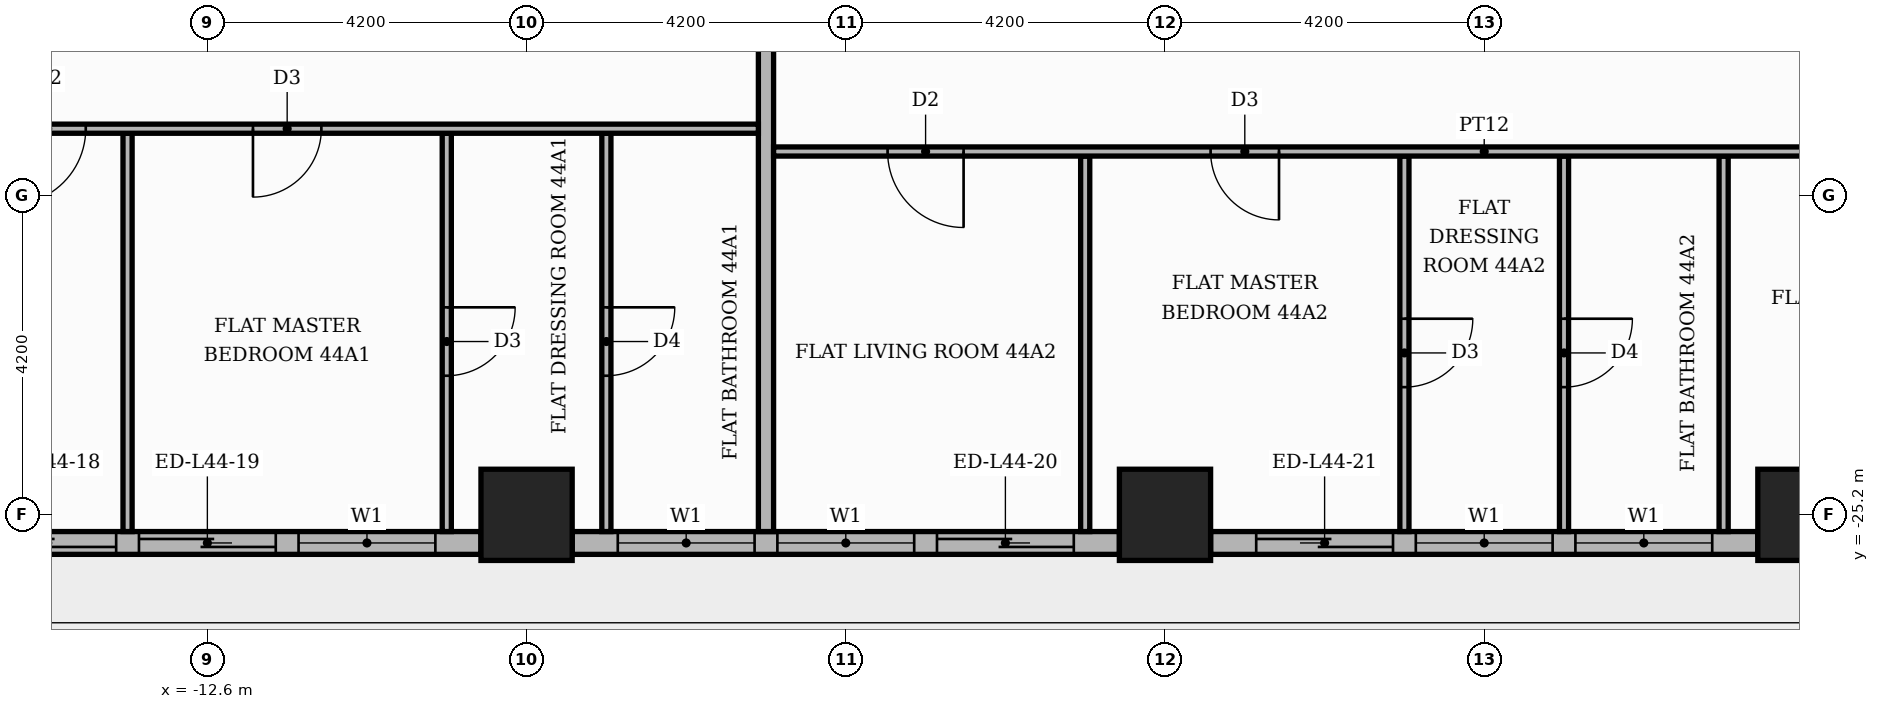
"""IFC4 building model, lengths in metres.
Left out: names, types, materials, properties, quantities, classifications, styles, units other than length and angle.
Written with IfcOpenShell. Run it as: python <this file> out.ifc"""

import sys

from ifc_helpers import new_model, si_unit, direction, frame, frame_2d, origin, origin_2d, place, context, subcontext, project, spatial, rectangle, extrude, element, fill, save


model = new_model("IFC4")
c1 = context("Model", 3, precision=1e-05, world=origin(), true_north=direction((0.0, 1.0)))
c2 = subcontext(c1, "Body", "Model", "MODEL_VIEW")
j1 = project(units=[si_unit("LENGTHUNIT", "METRE"), si_unit("PLANEANGLEUNIT", "RADIAN")], contexts=[c1])
p1 = place(None, origin())
s1 = spatial("IfcSite", under=j1, at=p1, CompositionType="ELEMENT")
p2 = place(p1, origin())
s2 = spatial("IfcBuilding", under=s1, at=p2, CompositionType="ELEMENT")
p3 = place(p2, frame((0.0, 0.0, 188.4)))
s3 = spatial("IfcBuildingStorey", under=s2, at=p3, CompositionType="ELEMENT", Elevation=188.4)
for number, where, z_axis, x_axis in (
    (1, (0.0, -25.2, 0.0), (0.0, 0.0, 1.0), (1.0, 0.0, 0.0)),
    (2, (8.4, -25.2, 0.0), (0.0, 0.0, 1.0), (1.0, 0.0, 0.0)),
    (3, (-8.4, -25.2, 0.0), (0.0, 0.0, 1.0), (1.0, 0.0, 0.0)),
):
    element("IfcColumn", number, at=place(p3, frame(where, z_axis=z_axis, x_axis=x_axis)), inside=s3, PredefinedType="COLUMN", context=c2, shape_type="SweptSolid", body=[
        extrude(rectangle(XDim=1.2, YDim=1.2, at=origin_2d()), origin(), (0.0, 0.0, 1.0), 3.9),
    ])
p4 = place(p3, frame((-16.2, -25.57, 0.0), z_axis=(0.0, 0.0, 1.0), x_axis=(1.0, 0.0, 0.0)))
e4 = element("IfcWall", 4, at=p4, inside=s3, PredefinedType="STANDARD", context=c2, shape_type="SweptSolid", body=[
    extrude(rectangle(XDim=7.2, YDim=0.3, at=frame_2d((3.6, 0.0))), origin(), (0.0, 0.0, 1.0), 3.48),
])
p5 = place(p4, frame((0.6, 0.0, 0.0)))
e5 = element("IfcOpeningElement", 5, at=p5, cuts=e4, PredefinedType="OPENING", context=c2, shape_type="SweptSolid", body=[
    extrude(rectangle(XDim=1.8, YDim=2.4, at=frame_2d((0.9, 1.2))), frame((0.0, 0.16, 0.0), z_axis=(0.0, -1.0, 0.0), x_axis=(1.0, 0.0, 0.0)), (0.0, 0.0, 1.0), 0.32),
])
p6 = place(p4, frame((2.7, 0.0, 0.0)))
e6 = element("IfcOpeningElement", 6, at=p6, cuts=e4, PredefinedType="OPENING", context=c2, shape_type="SweptSolid", body=[
    extrude(rectangle(XDim=1.8, YDim=2.4, at=frame_2d((0.9, 1.2))), frame((0.0, 0.16, 0.0), z_axis=(0.0, -1.0, 0.0), x_axis=(1.0, 0.0, 0.0)), (0.0, 0.0, 1.0), 0.32),
])
p7 = place(p4, frame((4.8, 0.0, 0.9)))
e7 = element("IfcOpeningElement", 7, at=p7, cuts=e4, PredefinedType="OPENING", context=c2, shape_type="SweptSolid", body=[
    extrude(rectangle(XDim=1.8, YDim=2.1, at=frame_2d((0.9, 1.05))), frame((0.0, 0.16, 0.0), z_axis=(0.0, -1.0, 0.0), x_axis=(1.0, 0.0, 0.0)), (0.0, 0.0, 1.0), 0.32),
])
p8 = place(p3, frame((-7.8, -25.57, 0.0), z_axis=(0.0, 0.0, 1.0), x_axis=(1.0, 0.0, 0.0)))
e8 = element("IfcWall", 8, at=p8, inside=s3, PredefinedType="STANDARD", context=c2, shape_type="SweptSolid", body=[
    extrude(rectangle(XDim=7.2, YDim=0.3, at=frame_2d((3.6, 0.0))), origin(), (0.0, 0.0, 1.0), 3.48),
])
p9 = place(p8, frame((0.6, 0.0, 0.9)))
e9 = element("IfcOpeningElement", 9, at=p9, cuts=e8, PredefinedType="OPENING", context=c2, shape_type="SweptSolid", body=[
    extrude(rectangle(XDim=1.8, YDim=2.1, at=frame_2d((0.9, 1.05))), frame((0.0, 0.16, 0.0), z_axis=(0.0, -1.0, 0.0), x_axis=(1.0, 0.0, 0.0)), (0.0, 0.0, 1.0), 0.32),
])
p10 = place(p8, frame((2.7, 0.0, 0.9)))
e10 = element("IfcOpeningElement", 10, at=p10, cuts=e8, PredefinedType="OPENING", context=c2, shape_type="SweptSolid", body=[
    extrude(rectangle(XDim=1.8, YDim=2.1, at=frame_2d((0.9, 1.05))), frame((0.0, 0.16, 0.0), z_axis=(0.0, -1.0, 0.0), x_axis=(1.0, 0.0, 0.0)), (0.0, 0.0, 1.0), 0.32),
])
p11 = place(p8, frame((4.8, 0.0, 0.0)))
e11 = element("IfcOpeningElement", 11, at=p11, cuts=e8, PredefinedType="OPENING", context=c2, shape_type="SweptSolid", body=[
    extrude(rectangle(XDim=1.8, YDim=2.4, at=frame_2d((0.9, 1.2))), frame((0.0, 0.16, 0.0), z_axis=(0.0, -1.0, 0.0), x_axis=(1.0, 0.0, 0.0)), (0.0, 0.0, 1.0), 0.32),
])
p12 = place(p3, frame((0.6, -25.57, 0.0), z_axis=(0.0, 0.0, 1.0), x_axis=(1.0, 0.0, 0.0)))
e12 = element("IfcWall", 12, at=p12, inside=s3, PredefinedType="STANDARD", context=c2, shape_type="SweptSolid", body=[
    extrude(rectangle(XDim=7.2, YDim=0.3, at=frame_2d((3.6, 0.0))), origin(), (0.0, 0.0, 1.0), 3.48),
])
p13 = place(p12, frame((0.6, 0.0, 0.0)))
e13 = element("IfcOpeningElement", 13, at=p13, cuts=e12, PredefinedType="OPENING", context=c2, shape_type="SweptSolid", body=[
    extrude(rectangle(XDim=1.8, YDim=2.4, at=frame_2d((0.9, 1.2))), frame((0.0, 0.16, 0.0), z_axis=(0.0, -1.0, 0.0), x_axis=(1.0, 0.0, 0.0)), (0.0, 0.0, 1.0), 0.32),
])
p14 = place(p12, frame((2.7, 0.0, 0.9)))
e14 = element("IfcOpeningElement", 14, at=p14, cuts=e12, PredefinedType="OPENING", context=c2, shape_type="SweptSolid", body=[
    extrude(rectangle(XDim=1.8, YDim=2.1, at=frame_2d((0.9, 1.05))), frame((0.0, 0.16, 0.0), z_axis=(0.0, -1.0, 0.0), x_axis=(1.0, 0.0, 0.0)), (0.0, 0.0, 1.0), 0.32),
])
p15 = place(p12, frame((4.8, 0.0, 0.9)))
e15 = element("IfcOpeningElement", 15, at=p15, cuts=e12, PredefinedType="OPENING", context=c2, shape_type="SweptSolid", body=[
    extrude(rectangle(XDim=1.8, YDim=2.1, at=frame_2d((0.9, 1.05))), frame((0.0, 0.16, 0.0), z_axis=(0.0, -1.0, 0.0), x_axis=(1.0, 0.0, 0.0)), (0.0, 0.0, 1.0), 0.32),
])
p16 = place(p3, frame((-13.65, -25.42, 0.0), z_axis=(0.0, 0.0, 1.0), x_axis=(0.0, 1.0, 0.0)))
e16 = element("IfcWall", 16, at=p16, inside=s3, PredefinedType="PARTITIONING", context=c2, shape_type="SweptSolid", body=[
    extrude(rectangle(XDim=5.24, YDim=0.12, at=frame_2d((2.62, 0.0))), origin(), (0.0, 0.0, 1.0), 3.48),
])
p17 = place(p3, frame((-9.45, -25.42, 0.0), z_axis=(0.0, 0.0, 1.0), x_axis=(0.0, 1.0, 0.0)))
e17 = element("IfcWall", 17, at=p17, inside=s3, PredefinedType="PARTITIONING", context=c2, shape_type="SweptSolid", body=[
    extrude(rectangle(XDim=5.24, YDim=0.12, at=frame_2d((2.62, 0.0))), origin(), (0.0, 0.0, 1.0), 3.48),
])
p18 = place(p17, frame((2.05, 0.0, 0.0)))
e18 = element("IfcOpeningElement", 18, at=p18, cuts=e17, PredefinedType="OPENING", context=c2, shape_type="SweptSolid", body=[
    extrude(rectangle(XDim=0.9, YDim=2.1, at=frame_2d((0.45, 1.05))), frame((0.0, 0.07, 0.0), z_axis=(0.0, -1.0, 0.0), x_axis=(1.0, 0.0, 0.0)), (0.0, 0.0, 1.0), 0.14),
])
p19 = place(p3, frame((-7.35, -25.42, 0.0), z_axis=(0.0, 0.0, 1.0), x_axis=(0.0, 1.0, 0.0)))
e19 = element("IfcWall", 19, at=p19, inside=s3, PredefinedType="PARTITIONING", context=c2, shape_type="SweptSolid", body=[
    extrude(rectangle(XDim=5.24, YDim=0.12, at=frame_2d((2.62, 0.0))), origin(), (0.0, 0.0, 1.0), 3.48),
])
p20 = place(p19, frame((2.05, 0.0, 0.0)))
e20 = element("IfcOpeningElement", 20, at=p20, cuts=e19, PredefinedType="OPENING", context=c2, shape_type="SweptSolid", body=[
    extrude(rectangle(XDim=0.9, YDim=2.1, at=frame_2d((0.45, 1.05))), frame((0.0, 0.07, 0.0), z_axis=(0.0, -1.0, 0.0), x_axis=(1.0, 0.0, 0.0)), (0.0, 0.0, 1.0), 0.14),
])
p21 = place(p3, frame((-5.25, -25.42, 0.0), z_axis=(0.0, 0.0, 1.0), x_axis=(0.0, 1.0, 0.0)))
e21 = element("IfcWall", 21, at=p21, inside=s3, PredefinedType="PARTITIONING", context=c2, shape_type="SweptSolid", body=[
    extrude(rectangle(XDim=11.67, YDim=0.2, at=frame_2d((5.835, 0.0))), origin(), (0.0, 0.0, 1.0), 3.48),
])
p22 = place(p3, frame((-1.05, -25.42, 0.0), z_axis=(0.0, 0.0, 1.0), x_axis=(0.0, 1.0, 0.0)))
e22 = element("IfcWall", 22, at=p22, inside=s3, PredefinedType="PARTITIONING", context=c2, shape_type="SweptSolid", body=[
    extrude(rectangle(XDim=4.94, YDim=0.12, at=frame_2d((2.47, 0.0))), origin(), (0.0, 0.0, 1.0), 3.48),
])
p23 = place(p3, frame((3.15, -25.42, 0.0), z_axis=(0.0, 0.0, 1.0), x_axis=(0.0, 1.0, 0.0)))
e23 = element("IfcWall", 23, at=p23, inside=s3, PredefinedType="PARTITIONING", context=c2, shape_type="SweptSolid", body=[
    extrude(rectangle(XDim=4.94, YDim=0.12, at=frame_2d((2.47, 0.0))), origin(), (0.0, 0.0, 1.0), 3.48),
])
p24 = place(p23, frame((1.9, 0.0, 0.0)))
e24 = element("IfcOpeningElement", 24, at=p24, cuts=e23, PredefinedType="OPENING", context=c2, shape_type="SweptSolid", body=[
    extrude(rectangle(XDim=0.9, YDim=2.1, at=frame_2d((0.45, 1.05))), frame((0.0, 0.07, 0.0), z_axis=(0.0, -1.0, 0.0), x_axis=(1.0, 0.0, 0.0)), (0.0, 0.0, 1.0), 0.14),
])
p25 = place(p3, frame((5.25, -25.42, 0.0), z_axis=(0.0, 0.0, 1.0), x_axis=(0.0, 1.0, 0.0)))
e25 = element("IfcWall", 25, at=p25, inside=s3, PredefinedType="PARTITIONING", context=c2, shape_type="SweptSolid", body=[
    extrude(rectangle(XDim=4.94, YDim=0.12, at=frame_2d((2.47, 0.0))), origin(), (0.0, 0.0, 1.0), 3.48),
])
p26 = place(p25, frame((1.9, 0.0, 0.0)))
e26 = element("IfcOpeningElement", 26, at=p26, cuts=e25, PredefinedType="OPENING", context=c2, shape_type="SweptSolid", body=[
    extrude(rectangle(XDim=0.9, YDim=2.1, at=frame_2d((0.45, 1.05))), frame((0.0, 0.07, 0.0), z_axis=(0.0, -1.0, 0.0), x_axis=(1.0, 0.0, 0.0)), (0.0, 0.0, 1.0), 0.14),
])
p27 = place(p3, frame((7.35, -25.42, 0.0), z_axis=(0.0, 0.0, 1.0), x_axis=(0.0, 1.0, 0.0)))
e27 = element("IfcWall", 27, at=p27, inside=s3, PredefinedType="PARTITIONING", context=c2, shape_type="SweptSolid", body=[
    extrude(rectangle(XDim=4.94, YDim=0.12, at=frame_2d((2.47, 0.0))), origin(), (0.0, 0.0, 1.0), 3.48),
])
p28 = place(p3, frame((-5.15, -20.42, 0.0), z_axis=(0.0, 0.0, 1.0), x_axis=(1.0, 0.0, 0.0)))
e28 = element("IfcWall", 28, at=p28, inside=s3, PredefinedType="PARTITIONING", context=c2, shape_type="SweptSolid", body=[
    extrude(rectangle(XDim=18.7, YDim=0.12, at=frame_2d((9.35, 0.0))), origin(), (0.0, 0.0, 1.0), 3.48),
])
p29 = place(p28, frame((1.5, 0.0, 0.0)))
e29 = element("IfcOpeningElement", 29, at=p29, cuts=e28, PredefinedType="OPENING", context=c2, shape_type="SweptSolid", body=[
    extrude(rectangle(XDim=1.0, YDim=2.1, at=frame_2d((0.5, 1.05))), frame((0.0, 0.07, 0.0), z_axis=(0.0, -1.0, 0.0), x_axis=(1.0, 0.0, 0.0)), (0.0, 0.0, 1.0), 0.14),
])
p30 = place(p28, frame((5.75, 0.0, 0.0)))
e30 = element("IfcOpeningElement", 30, at=p30, cuts=e28, PredefinedType="OPENING", context=c2, shape_type="SweptSolid", body=[
    extrude(rectangle(XDim=0.9, YDim=2.1, at=frame_2d((0.45, 1.05))), frame((0.0, 0.07, 0.0), z_axis=(0.0, -1.0, 0.0), x_axis=(1.0, 0.0, 0.0)), (0.0, 0.0, 1.0), 0.14),
])
p31 = place(p28, frame((14.15, 0.0, 0.0)))
e31 = element("IfcOpeningElement", 31, at=p31, cuts=e28, PredefinedType="OPENING", context=c2, shape_type="SweptSolid", body=[
    extrude(rectangle(XDim=0.9, YDim=2.1, at=frame_2d((0.45, 1.05))), frame((0.0, 0.07, 0.0), z_axis=(0.0, -1.0, 0.0), x_axis=(1.0, 0.0, 0.0)), (0.0, 0.0, 1.0), 0.14),
])
p32 = place(p3, frame((-25.42, -20.12, 0.0), z_axis=(0.0, 0.0, 1.0), x_axis=(1.0, 0.0, 0.0)))
e32 = element("IfcWall", 32, at=p32, inside=s3, PredefinedType="PARTITIONING", context=c2, shape_type="SweptSolid", body=[
    extrude(rectangle(XDim=20.07, YDim=0.12, at=frame_2d((10.035, 0.0))), origin(), (0.0, 0.0, 1.0), 3.48),
])
p33 = place(p32, frame((10.22, 0.0, 0.0)))
e33 = element("IfcOpeningElement", 33, at=p33, cuts=e32, PredefinedType="OPENING", context=c2, shape_type="SweptSolid", body=[
    extrude(rectangle(XDim=1.0, YDim=2.1, at=frame_2d((0.5, 1.05))), frame((0.0, 0.07, 0.0), z_axis=(0.0, -1.0, 0.0), x_axis=(1.0, 0.0, 0.0)), (0.0, 0.0, 1.0), 0.14),
])
p34 = place(p32, frame((13.42, 0.0, 0.0)))
e34 = element("IfcOpeningElement", 34, at=p34, cuts=e32, PredefinedType="OPENING", context=c2, shape_type="SweptSolid", body=[
    extrude(rectangle(XDim=0.9, YDim=2.1, at=frame_2d((0.45, 1.05))), frame((0.0, 0.07, 0.0), z_axis=(0.0, -1.0, 0.0), x_axis=(1.0, 0.0, 0.0)), (0.0, 0.0, 1.0), 0.14),
])
p35 = place(p5, origin())
e35 = element("IfcDoor", 35, at=p35, inside=s3, OperationType="SLIDING_TO_LEFT", PredefinedType="DOOR", context=c2, shape_type="SweptSolid", body=[
    extrude(rectangle(XDim=1.8, YDim=2.4, at=frame_2d((0.9, 1.2))), frame((0.0, 0.025, 0.0), z_axis=(0.0, -1.0, 0.0), x_axis=(1.0, 0.0, 0.0)), (0.0, 0.0, 1.0), 0.05),
])
fill(e5, e35)
p36 = place(p6, origin())
e36 = element("IfcDoor", 36, at=p36, inside=s3, OperationType="SLIDING_TO_RIGHT", PredefinedType="DOOR", context=c2, shape_type="SweptSolid", body=[
    extrude(rectangle(XDim=1.8, YDim=2.4, at=frame_2d((0.9, 1.2))), frame((0.0, 0.025, 0.0), z_axis=(0.0, -1.0, 0.0), x_axis=(1.0, 0.0, 0.0)), (0.0, 0.0, 1.0), 0.05),
])
fill(e6, e36)
p37 = place(p7, origin())
e37 = element("IfcWindow", 37, at=p37, inside=s3, PartitioningType="SINGLE_PANEL", PredefinedType="WINDOW", context=c2, shape_type="SweptSolid", body=[
    extrude(rectangle(XDim=1.8, YDim=2.1, at=frame_2d((0.9, 1.05))), frame((0.0, 0.03, 0.0), z_axis=(0.0, -1.0, 0.0), x_axis=(1.0, 0.0, 0.0)), (0.0, 0.0, 1.0), 0.06),
])
fill(e7, e37)
p38 = place(p9, origin())
e38 = element("IfcWindow", 38, at=p38, inside=s3, PartitioningType="SINGLE_PANEL", PredefinedType="WINDOW", context=c2, shape_type="SweptSolid", body=[
    extrude(rectangle(XDim=1.8, YDim=2.1, at=frame_2d((0.9, 1.05))), frame((0.0, 0.03, 0.0), z_axis=(0.0, -1.0, 0.0), x_axis=(1.0, 0.0, 0.0)), (0.0, 0.0, 1.0), 0.06),
])
fill(e9, e38)
p39 = place(p10, origin())
e39 = element("IfcWindow", 39, at=p39, inside=s3, PartitioningType="SINGLE_PANEL", PredefinedType="WINDOW", context=c2, shape_type="SweptSolid", body=[
    extrude(rectangle(XDim=1.8, YDim=2.1, at=frame_2d((0.9, 1.05))), frame((0.0, 0.03, 0.0), z_axis=(0.0, -1.0, 0.0), x_axis=(1.0, 0.0, 0.0)), (0.0, 0.0, 1.0), 0.06),
])
fill(e10, e39)
p40 = place(p11, origin())
e40 = element("IfcDoor", 40, at=p40, inside=s3, OperationType="SLIDING_TO_RIGHT", PredefinedType="DOOR", context=c2, shape_type="SweptSolid", body=[
    extrude(rectangle(XDim=1.8, YDim=2.4, at=frame_2d((0.9, 1.2))), frame((0.0, 0.025, 0.0), z_axis=(0.0, -1.0, 0.0), x_axis=(1.0, 0.0, 0.0)), (0.0, 0.0, 1.0), 0.05),
])
fill(e11, e40)
p41 = place(p13, origin())
e41 = element("IfcDoor", 41, at=p41, inside=s3, OperationType="SLIDING_TO_LEFT", PredefinedType="DOOR", context=c2, shape_type="SweptSolid", body=[
    extrude(rectangle(XDim=1.8, YDim=2.4, at=frame_2d((0.9, 1.2))), frame((0.0, 0.025, 0.0), z_axis=(0.0, -1.0, 0.0), x_axis=(1.0, 0.0, 0.0)), (0.0, 0.0, 1.0), 0.05),
])
fill(e13, e41)
p42 = place(p14, origin())
e42 = element("IfcWindow", 42, at=p42, inside=s3, PartitioningType="SINGLE_PANEL", PredefinedType="WINDOW", context=c2, shape_type="SweptSolid", body=[
    extrude(rectangle(XDim=1.8, YDim=2.1, at=frame_2d((0.9, 1.05))), frame((0.0, 0.03, 0.0), z_axis=(0.0, -1.0, 0.0), x_axis=(1.0, 0.0, 0.0)), (0.0, 0.0, 1.0), 0.06),
])
fill(e14, e42)
p43 = place(p15, origin())
e43 = element("IfcWindow", 43, at=p43, inside=s3, PartitioningType="SINGLE_PANEL", PredefinedType="WINDOW", context=c2, shape_type="SweptSolid", body=[
    extrude(rectangle(XDim=1.8, YDim=2.1, at=frame_2d((0.9, 1.05))), frame((0.0, 0.03, 0.0), z_axis=(0.0, -1.0, 0.0), x_axis=(1.0, 0.0, 0.0)), (0.0, 0.0, 1.0), 0.06),
])
fill(e15, e43)
p44 = place(p33, frame((1.0, 0.0, 0.0), z_axis=(0.0, 0.0, 1.0), x_axis=(-1.0, 0.0, 0.0)))
e44 = element("IfcDoor", 44, at=p44, inside=s3, OperationType="SINGLE_SWING_LEFT", PredefinedType="DOOR", context=c2, shape_type="SweptSolid", body=[
    extrude(rectangle(XDim=1.0, YDim=2.1, at=frame_2d((0.5, 1.05))), frame((0.0, 0.025, 0.0), z_axis=(0.0, -1.0, 0.0), x_axis=(1.0, 0.0, 0.0)), (0.0, 0.0, 1.0), 0.05),
])
fill(e33, e44)
p45 = place(p34, frame((0.9, 0.0, 0.0), z_axis=(0.0, 0.0, 1.0), x_axis=(-1.0, 0.0, 0.0)))
e45 = element("IfcDoor", 45, at=p45, inside=s3, OperationType="SINGLE_SWING_LEFT", PredefinedType="DOOR", context=c2, shape_type="SweptSolid", body=[
    extrude(rectangle(XDim=0.9, YDim=2.1, at=frame_2d((0.45, 1.05))), frame((0.0, 0.025, 0.0), z_axis=(0.0, -1.0, 0.0), x_axis=(1.0, 0.0, 0.0)), (0.0, 0.0, 1.0), 0.05),
])
fill(e34, e45)
p46 = place(p18, frame((0.9, 0.0, 0.0), z_axis=(0.0, 0.0, 1.0), x_axis=(-1.0, 0.0, 0.0)))
e46 = element("IfcDoor", 46, at=p46, inside=s3, OperationType="SINGLE_SWING_RIGHT", PredefinedType="DOOR", context=c2, shape_type="SweptSolid", body=[
    extrude(rectangle(XDim=0.9, YDim=2.1, at=frame_2d((0.45, 1.05))), frame((0.0, 0.025, 0.0), z_axis=(0.0, -1.0, 0.0), x_axis=(1.0, 0.0, 0.0)), (0.0, 0.0, 1.0), 0.05),
])
fill(e18, e46)
p47 = place(p20, frame((0.9, 0.0, 0.0), z_axis=(0.0, 0.0, 1.0), x_axis=(-1.0, 0.0, 0.0)))
e47 = element("IfcDoor", 47, at=p47, inside=s3, OperationType="SINGLE_SWING_RIGHT", PredefinedType="DOOR", context=c2, shape_type="SweptSolid", body=[
    extrude(rectangle(XDim=0.9, YDim=2.1, at=frame_2d((0.45, 1.05))), frame((0.0, 0.025, 0.0), z_axis=(0.0, -1.0, 0.0), x_axis=(1.0, 0.0, 0.0)), (0.0, 0.0, 1.0), 0.05),
])
fill(e20, e47)
p48 = place(p29, frame((1.0, 0.0, 0.0), z_axis=(0.0, 0.0, 1.0), x_axis=(-1.0, 0.0, 0.0)))
e48 = element("IfcDoor", 48, at=p48, inside=s3, OperationType="SINGLE_SWING_RIGHT", PredefinedType="DOOR", context=c2, shape_type="SweptSolid", body=[
    extrude(rectangle(XDim=1.0, YDim=2.1, at=frame_2d((0.5, 1.05))), frame((0.0, 0.025, 0.0), z_axis=(0.0, -1.0, 0.0), x_axis=(1.0, 0.0, 0.0)), (0.0, 0.0, 1.0), 0.05),
])
fill(e29, e48)
p49 = place(p30, frame((0.9, 0.0, 0.0), z_axis=(0.0, 0.0, 1.0), x_axis=(-1.0, 0.0, 0.0)))
e49 = element("IfcDoor", 49, at=p49, inside=s3, OperationType="SINGLE_SWING_RIGHT", PredefinedType="DOOR", context=c2, shape_type="SweptSolid", body=[
    extrude(rectangle(XDim=0.9, YDim=2.1, at=frame_2d((0.45, 1.05))), frame((0.0, 0.025, 0.0), z_axis=(0.0, -1.0, 0.0), x_axis=(1.0, 0.0, 0.0)), (0.0, 0.0, 1.0), 0.05),
])
fill(e30, e49)
p50 = place(p24, frame((0.9, 0.0, 0.0), z_axis=(0.0, 0.0, 1.0), x_axis=(-1.0, 0.0, 0.0)))
e50 = element("IfcDoor", 50, at=p50, inside=s3, OperationType="SINGLE_SWING_RIGHT", PredefinedType="DOOR", context=c2, shape_type="SweptSolid", body=[
    extrude(rectangle(XDim=0.9, YDim=2.1, at=frame_2d((0.45, 1.05))), frame((0.0, 0.025, 0.0), z_axis=(0.0, -1.0, 0.0), x_axis=(1.0, 0.0, 0.0)), (0.0, 0.0, 1.0), 0.05),
])
fill(e24, e50)
p51 = place(p26, frame((0.9, 0.0, 0.0), z_axis=(0.0, 0.0, 1.0), x_axis=(-1.0, 0.0, 0.0)))
e51 = element("IfcDoor", 51, at=p51, inside=s3, OperationType="SINGLE_SWING_RIGHT", PredefinedType="DOOR", context=c2, shape_type="SweptSolid", body=[
    extrude(rectangle(XDim=0.9, YDim=2.1, at=frame_2d((0.45, 1.05))), frame((0.0, 0.025, 0.0), z_axis=(0.0, -1.0, 0.0), x_axis=(1.0, 0.0, 0.0)), (0.0, 0.0, 1.0), 0.05),
])
fill(e26, e51)
save(model, sys.argv[1])
